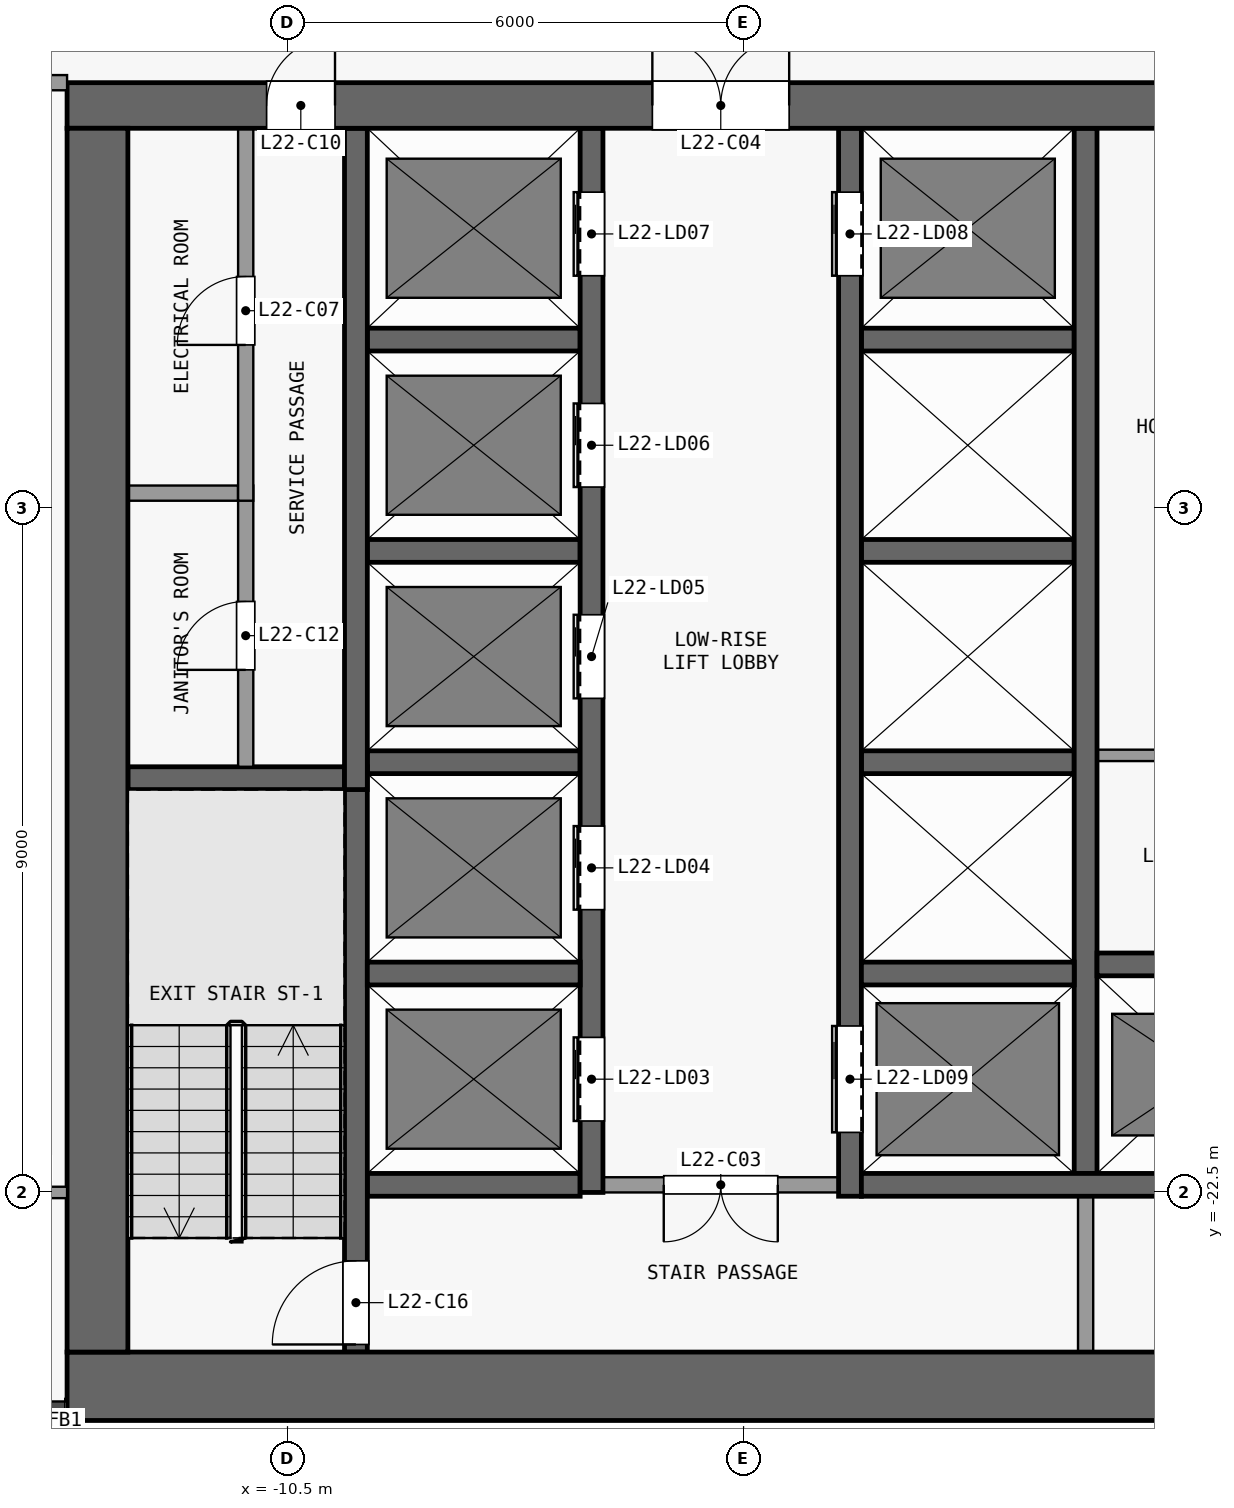
"""IFC4 building model, lengths in metres.
Left out: names, types, materials, properties, quantities, classifications, styles, units other than length and angle.
Written with IfcOpenShell. Run it as: python <this file> out.ifc"""

import sys

from ifc_helpers import new_model, si_unit, direction, frame, frame_2d, origin, place, context, subcontext, project, spatial, rectangle, extrude, element, fill, save


model = new_model("IFC4")
c1 = context("Model", 3, precision=1e-05, world=origin(), true_north=direction((0.0, 1.0)))
c2 = subcontext(c1, "Body", "Model", "MODEL_VIEW")
j1 = project(units=[si_unit("LENGTHUNIT", "METRE"), si_unit("PLANEANGLEUNIT", "RADIAN")], contexts=[c1])
p1 = place(None, origin())
s1 = spatial("IfcSite", under=j1, at=p1, CompositionType="ELEMENT")
p2 = place(p1, origin())
s2 = spatial("IfcBuilding", under=s1, at=p2, CompositionType="ELEMENT")
p3 = place(p2, frame((0.0, 0.0, 91.9)))
s3 = spatial("IfcBuildingStorey", under=s2, at=p3, CompositionType="ELEMENT", Elevation=91.9)
p4 = place(p3, frame((-13.4, -25.05, 0.0), z_axis=(0.0, 0.0, 1.0), x_axis=(1.0, 0.0, 0.0)))
e1 = element("IfcWall", 1, at=p4, inside=s3, PredefinedType="SHEAR", context=c2, shape_type="SweptSolid", body=[
    extrude(rectangle(XDim=26.8, YDim=0.9, at=frame_2d((13.4, 0.0))), origin(), (0.0, 0.0, 1.0), 3.3),
])
p5 = place(p3, frame((-13.4, -8.2, 0.0), z_axis=(0.0, 0.0, 1.0), x_axis=(1.0, 0.0, 0.0)))
e2 = element("IfcWall", 2, at=p5, inside=s3, PredefinedType="SHEAR", context=c2, shape_type="SweptSolid", body=[
    extrude(rectangle(XDim=26.8, YDim=0.6, at=frame_2d((13.4, 0.0))), origin(), (0.0, 0.0, 1.0), 3.3),
])
p6 = place(p5, frame((7.7, 0.0, 0.0)))
e3 = element("IfcOpeningElement", 3, at=p6, cuts=e2, PredefinedType="OPENING", context=c2, shape_type="SweptSolid", body=[
    extrude(rectangle(XDim=1.8, YDim=2.1, at=frame_2d((0.9, 1.05))), frame((0.0, 0.31, 0.0), z_axis=(0.0, -1.0, 0.0), x_axis=(1.0, 0.0, 0.0)), (0.0, 0.0, 1.0), 0.62),
])
p7 = place(p5, frame((17.3, 0.0, 0.0)))
e4 = element("IfcOpeningElement", 4, at=p7, cuts=e2, PredefinedType="OPENING", context=c2, shape_type="SweptSolid", body=[
    extrude(rectangle(XDim=1.8, YDim=2.1, at=frame_2d((0.9, 1.05))), frame((0.0, 0.31, 0.0), z_axis=(0.0, -1.0, 0.0), x_axis=(1.0, 0.0, 0.0)), (0.0, 0.0, 1.0), 0.62),
])
p8 = place(p5, frame((2.625, 0.0, 0.0)))
e5 = element("IfcOpeningElement", 5, at=p8, cuts=e2, PredefinedType="OPENING", context=c2, shape_type="SweptSolid", body=[
    extrude(rectangle(XDim=0.9, YDim=2.1, at=frame_2d((0.45, 1.05))), frame((0.0, 0.31, 0.0), z_axis=(0.0, -1.0, 0.0), x_axis=(1.0, 0.0, 0.0)), (0.0, 0.0, 1.0), 0.62),
])
p9 = place(p5, frame((23.275, 0.0, 0.0)))
e6 = element("IfcOpeningElement", 6, at=p9, cuts=e2, PredefinedType="OPENING", context=c2, shape_type="SweptSolid", body=[
    extrude(rectangle(XDim=0.9, YDim=2.1, at=frame_2d((0.45, 1.05))), frame((0.0, 0.31, 0.0), z_axis=(0.0, -1.0, 0.0), x_axis=(1.0, 0.0, 0.0)), (0.0, 0.0, 1.0), 0.62),
])
p10 = place(p3, frame((-13.0, -24.6, 0.0), z_axis=(0.0, 0.0, 1.0), x_axis=(0.0, 1.0, 0.0)))
e7 = element("IfcWall", 7, at=p10, inside=s3, PredefinedType="SHEAR", context=c2, shape_type="SweptSolid", body=[
    extrude(rectangle(XDim=16.1, YDim=0.8, at=frame_2d((8.05, 0.0))), origin(), (0.0, 0.0, 1.0), 3.3),
])
p11 = place(p3, frame((-9.45, -22.4, 0.0), z_axis=(0.0, 0.0, 1.0), x_axis=(1.0, 0.0, 0.0)))
e8 = element("IfcWall", 8, at=p11, inside=s3, PredefinedType="SHEAR", context=c2, shape_type="SweptSolid", body=[
    extrude(rectangle(XDim=2.8, YDim=0.3, at=frame_2d((1.4, 0.0))), origin(), (0.0, 0.0, 1.0), 3.3),
])
p12 = place(p3, frame((-3.25, -22.4, 0.0), z_axis=(0.0, 0.0, 1.0), x_axis=(-1.0, 0.0, 0.0)))
e9 = element("IfcWall", 9, at=p12, inside=s3, PredefinedType="PARTITIONING", context=c2, shape_type="SweptSolid", body=[
    extrude(rectangle(XDim=3.1, YDim=0.2, at=frame_2d((1.55, 0.0))), origin(), (0.0, 0.0, 1.0), 3.3),
])
p13 = place(p12, frame((0.8, 0.0, 0.0)))
e10 = element("IfcOpeningElement", 10, at=p13, cuts=e9, PredefinedType="OPENING", context=c2, shape_type="SweptSolid", body=[
    extrude(rectangle(XDim=1.5, YDim=2.1, at=frame_2d((0.75, 1.05))), frame((0.0, 0.11, 0.0), z_axis=(0.0, -1.0, 0.0), x_axis=(1.0, 0.0, 0.0)), (0.0, 0.0, 1.0), 0.22),
])
p14 = place(p3, frame((-2.95, -22.4, 0.0), z_axis=(0.0, 0.0, 1.0), x_axis=(1.0, 0.0, 0.0)))
e11 = element("IfcWall", 11, at=p14, inside=s3, PredefinedType="SHEAR", context=c2, shape_type="SweptSolid", body=[
    extrude(rectangle(XDim=6.2, YDim=0.3, at=frame_2d((3.1, 0.0))), origin(), (0.0, 0.0, 1.0), 3.3),
])
for number, where, z_axis, x_axis in (
    (12, (-9.45, -19.62, 0.0), (0.0, 0.0, 1.0), (1.0, 0.0, 0.0)),
    (13, (-2.95, -19.62, 0.0), (0.0, 0.0, 1.0), (1.0, 0.0, 0.0)),
):
    element("IfcWall", number, at=place(p3, frame(where, z_axis=z_axis, x_axis=x_axis)), inside=s3, PredefinedType="SHEAR", context=c2, shape_type="SweptSolid", body=[
        extrude(rectangle(XDim=2.8, YDim=0.3, at=frame_2d((1.4, 0.0))), origin(), (0.0, 0.0, 1.0), 3.3),
    ])
p15 = place(p3, frame((0.15, -19.5, 0.0), z_axis=(0.0, 0.0, 1.0), x_axis=(1.0, 0.0, 0.0)))
e14 = element("IfcWall", 14, at=p15, inside=s3, PredefinedType="SHEAR", context=c2, shape_type="SweptSolid", body=[
    extrude(rectangle(XDim=3.025, YDim=0.3, at=frame_2d((1.513, 0.0))), origin(), (0.0, 0.0, 1.0), 3.3),
])
p16 = place(p3, frame((-12.6, -17.05, 0.0), z_axis=(0.0, 0.0, 1.0), x_axis=(1.0, 0.0, 0.0)))
e15 = element("IfcWall", 15, at=p16, inside=s3, PredefinedType="SHEAR", context=c2, shape_type="SweptSolid", body=[
    extrude(rectangle(XDim=2.85, YDim=0.3, at=frame_2d((1.425, 0.0))), origin(), (0.0, 0.0, 1.0), 3.3),
])
for number, where, z_axis, x_axis in (
    (16, (-9.45, -16.84, 0.0), (0.0, 0.0, 1.0), (1.0, 0.0, 0.0)),
    (17, (-2.95, -16.84, 0.0), (0.0, 0.0, 1.0), (1.0, 0.0, 0.0)),
):
    element("IfcWall", number, at=place(p3, frame(where, z_axis=z_axis, x_axis=x_axis)), inside=s3, PredefinedType="SHEAR", context=c2, shape_type="SweptSolid", body=[
        extrude(rectangle(XDim=2.8, YDim=0.3, at=frame_2d((1.4, 0.0))), origin(), (0.0, 0.0, 1.0), 3.3),
    ])
p17 = place(p3, frame((0.15, -16.75, 0.0), z_axis=(0.0, 0.0, 1.0), x_axis=(1.0, 0.0, 0.0)))
e18 = element("IfcWall", 18, at=p17, inside=s3, PredefinedType="PARTITIONING", context=c2, shape_type="SweptSolid", body=[
    extrude(rectangle(XDim=2.875, YDim=0.15, at=frame_2d((1.438, 0.0))), origin(), (0.0, 0.0, 1.0), 3.3),
])
for number, where, z_axis, x_axis in (
    (19, (-9.45, -14.06, 0.0), (0.0, 0.0, 1.0), (1.0, 0.0, 0.0)),
    (20, (-2.95, -14.06, 0.0), (0.0, 0.0, 1.0), (1.0, 0.0, 0.0)),
):
    element("IfcWall", number, at=place(p3, frame(where, z_axis=z_axis, x_axis=x_axis)), inside=s3, PredefinedType="SHEAR", context=c2, shape_type="SweptSolid", body=[
        extrude(rectangle(XDim=2.8, YDim=0.3, at=frame_2d((1.4, 0.0))), origin(), (0.0, 0.0, 1.0), 3.3),
    ])
p18 = place(p3, frame((-12.6, -13.3, 0.0), z_axis=(0.0, 0.0, 1.0), x_axis=(1.0, 0.0, 0.0)))
e21 = element("IfcWall", 21, at=p18, inside=s3, PredefinedType="PARTITIONING", context=c2, shape_type="SweptSolid", body=[
    extrude(rectangle(XDim=1.45, YDim=0.2, at=frame_2d((0.725, 0.0))), origin(), (0.0, 0.0, 1.0), 3.3),
])
for number, where, z_axis, x_axis in (
    (22, (-9.45, -11.28, 0.0), (0.0, 0.0, 1.0), (1.0, 0.0, 0.0)),
    (23, (-2.95, -11.28, 0.0), (0.0, 0.0, 1.0), (1.0, 0.0, 0.0)),
):
    element("IfcWall", number, at=place(p3, frame(where, z_axis=z_axis, x_axis=x_axis)), inside=s3, PredefinedType="SHEAR", context=c2, shape_type="SweptSolid", body=[
        extrude(rectangle(XDim=2.8, YDim=0.3, at=frame_2d((1.4, 0.0))), origin(), (0.0, 0.0, 1.0), 3.3),
    ])
p19 = place(p3, frame((-11.05, -16.9, 0.0), z_axis=(0.0, 0.0, 1.0), x_axis=(0.0, 1.0, 0.0)))
e24 = element("IfcWall", 24, at=p19, inside=s3, PredefinedType="PARTITIONING", context=c2, shape_type="SweptSolid", body=[
    extrude(rectangle(XDim=3.7, YDim=0.2, at=frame_2d((1.85, 0.0))), origin(), (0.0, 0.0, 1.0), 3.3),
])
p20 = place(p19, frame((1.275, 0.0, 0.0)))
e25 = element("IfcOpeningElement", 25, at=p20, cuts=e24, PredefinedType="OPENING", context=c2, shape_type="SweptSolid", body=[
    extrude(rectangle(XDim=0.9, YDim=2.1, at=frame_2d((0.45, 1.05))), frame((0.0, 0.11, 0.0), z_axis=(0.0, -1.0, 0.0), x_axis=(1.0, 0.0, 0.0)), (0.0, 0.0, 1.0), 0.22),
])
p21 = place(p3, frame((-11.05, -13.4, 0.0), z_axis=(0.0, 0.0, 1.0), x_axis=(0.0, 1.0, 0.0)))
e26 = element("IfcWall", 26, at=p21, inside=s3, PredefinedType="PARTITIONING", context=c2, shape_type="SweptSolid", body=[
    extrude(rectangle(XDim=4.9, YDim=0.2, at=frame_2d((2.45, 0.0))), origin(), (0.0, 0.0, 1.0), 3.3),
])
p22 = place(p21, frame((2.05, 0.0, 0.0)))
e27 = element("IfcOpeningElement", 27, at=p22, cuts=e26, PredefinedType="OPENING", context=c2, shape_type="SweptSolid", body=[
    extrude(rectangle(XDim=0.9, YDim=2.1, at=frame_2d((0.45, 1.05))), frame((0.0, 0.11, 0.0), z_axis=(0.0, -1.0, 0.0), x_axis=(1.0, 0.0, 0.0)), (0.0, 0.0, 1.0), 0.22),
])
p23 = place(p3, frame((-9.6, -24.6, 0.0), z_axis=(0.0, 0.0, 1.0), x_axis=(0.0, 1.0, 0.0)))
e28 = element("IfcWall", 28, at=p23, inside=s3, PredefinedType="SHEAR", context=c2, shape_type="SweptSolid", body=[
    extrude(rectangle(XDim=7.7, YDim=0.3, at=frame_2d((3.85, 0.0))), origin(), (0.0, 0.0, 1.0), 3.3),
])
p24 = place(p23, frame((0.1, 0.0, 0.0)))
e29 = element("IfcOpeningElement", 29, at=p24, cuts=e28, PredefinedType="OPENING", context=c2, shape_type="SweptSolid", body=[
    extrude(rectangle(XDim=1.1, YDim=2.1, at=frame_2d((0.55, 1.05))), frame((0.0, 0.16, 0.0), z_axis=(0.0, -1.0, 0.0), x_axis=(1.0, 0.0, 0.0)), (0.0, 0.0, 1.0), 0.32),
])
p25 = place(p3, frame((-9.6, -17.2, 0.0), z_axis=(0.0, 0.0, 1.0), x_axis=(0.0, 1.0, 0.0)))
e30 = element("IfcWall", 30, at=p25, inside=s3, PredefinedType="SHEAR", context=c2, shape_type="SweptSolid", body=[
    extrude(rectangle(XDim=8.7, YDim=0.3, at=frame_2d((4.35, 0.0))), origin(), (0.0, 0.0, 1.0), 3.3),
])
p26 = place(p3, frame((-6.5, -22.5, 0.0), z_axis=(0.0, 0.0, 1.0), x_axis=(0.0, 1.0, 0.0)))
e31 = element("IfcWall", 31, at=p26, inside=s3, PredefinedType="SHEAR", context=c2, shape_type="SweptSolid", body=[
    extrude(rectangle(XDim=14.0, YDim=0.3, at=frame_2d((7.0, 0.0))), origin(), (0.0, 0.0, 1.0), 3.3),
])
p27 = place(p26, frame((0.94, 0.0, 0.0)))
e32 = element("IfcOpeningElement", 32, at=p27, cuts=e31, PredefinedType="OPENING", context=c2, shape_type="SweptSolid", body=[
    extrude(rectangle(XDim=1.1, YDim=2.1, at=frame_2d((0.55, 1.05))), frame((0.0, 0.16, 0.0), z_axis=(0.0, -1.0, 0.0), x_axis=(1.0, 0.0, 0.0)), (0.0, 0.0, 1.0), 0.32),
])
p28 = place(p26, frame((3.72, 0.0, 0.0)))
e33 = element("IfcOpeningElement", 33, at=p28, cuts=e31, PredefinedType="OPENING", context=c2, shape_type="SweptSolid", body=[
    extrude(rectangle(XDim=1.1, YDim=2.1, at=frame_2d((0.55, 1.05))), frame((0.0, 0.16, 0.0), z_axis=(0.0, -1.0, 0.0), x_axis=(1.0, 0.0, 0.0)), (0.0, 0.0, 1.0), 0.32),
])
p29 = place(p26, frame((6.5, 0.0, 0.0)))
e34 = element("IfcOpeningElement", 34, at=p29, cuts=e31, PredefinedType="OPENING", context=c2, shape_type="SweptSolid", body=[
    extrude(rectangle(XDim=1.1, YDim=2.1, at=frame_2d((0.55, 1.05))), frame((0.0, 0.16, 0.0), z_axis=(0.0, -1.0, 0.0), x_axis=(1.0, 0.0, 0.0)), (0.0, 0.0, 1.0), 0.32),
])
p30 = place(p26, frame((9.28, 0.0, 0.0)))
e35 = element("IfcOpeningElement", 35, at=p30, cuts=e31, PredefinedType="OPENING", context=c2, shape_type="SweptSolid", body=[
    extrude(rectangle(XDim=1.1, YDim=2.1, at=frame_2d((0.55, 1.05))), frame((0.0, 0.16, 0.0), z_axis=(0.0, -1.0, 0.0), x_axis=(1.0, 0.0, 0.0)), (0.0, 0.0, 1.0), 0.32),
])
p31 = place(p26, frame((12.06, 0.0, 0.0)))
e36 = element("IfcOpeningElement", 36, at=p31, cuts=e31, PredefinedType="OPENING", context=c2, shape_type="SweptSolid", body=[
    extrude(rectangle(XDim=1.1, YDim=2.1, at=frame_2d((0.55, 1.05))), frame((0.0, 0.16, 0.0), z_axis=(0.0, -1.0, 0.0), x_axis=(1.0, 0.0, 0.0)), (0.0, 0.0, 1.0), 0.32),
])
p32 = place(p3, frame((-3.1, -22.55, 0.0), z_axis=(0.0, 0.0, 1.0), x_axis=(0.0, 1.0, 0.0)))
e37 = element("IfcWall", 37, at=p32, inside=s3, PredefinedType="SHEAR", context=c2, shape_type="SweptSolid", body=[
    extrude(rectangle(XDim=14.05, YDim=0.3, at=frame_2d((7.025, 0.0))), origin(), (0.0, 0.0, 1.0), 3.3),
])
p33 = place(p32, frame((12.11, 0.0, 0.0)))
e38 = element("IfcOpeningElement", 38, at=p33, cuts=e37, PredefinedType="OPENING", context=c2, shape_type="SweptSolid", body=[
    extrude(rectangle(XDim=1.1, YDim=2.1, at=frame_2d((0.55, 1.05))), frame((0.0, 0.16, 0.0), z_axis=(0.0, -1.0, 0.0), x_axis=(1.0, 0.0, 0.0)), (0.0, 0.0, 1.0), 0.32),
])
p34 = place(p32, frame((0.84, 0.0, 0.0)))
e39 = element("IfcOpeningElement", 39, at=p34, cuts=e37, PredefinedType="OPENING", context=c2, shape_type="SweptSolid", body=[
    extrude(rectangle(XDim=1.4, YDim=2.1, at=frame_2d((0.7, 1.05))), frame((0.0, 0.16, 0.0), z_axis=(0.0, -1.0, 0.0), x_axis=(1.0, 0.0, 0.0)), (0.0, 0.0, 1.0), 0.32),
])
p35 = place(p3, frame((0.0, -24.6, 0.0), z_axis=(0.0, 0.0, 1.0), x_axis=(0.0, 1.0, 0.0)))
e40 = element("IfcWall", 40, at=p35, inside=s3, PredefinedType="PARTITIONING", context=c2, shape_type="SweptSolid", body=[
    extrude(rectangle(XDim=2.05, YDim=0.2, at=frame_2d((1.025, 0.0))), origin(), (0.0, 0.0, 1.0), 3.3),
])
p36 = place(p3, frame((0.0, -22.25, 0.0), z_axis=(0.0, 0.0, 1.0), x_axis=(0.0, 1.0, 0.0)))
e41 = element("IfcWall", 41, at=p36, inside=s3, PredefinedType="SHEAR", context=c2, shape_type="SweptSolid", body=[
    extrude(rectangle(XDim=13.75, YDim=0.3, at=frame_2d((6.875, 0.0))), origin(), (0.0, 0.0, 1.0), 3.3),
])
p37 = place(p3, frame((-16.325, -22.5, 0.0), z_axis=(0.0, 0.0, 1.0), x_axis=(1.0, 0.0, 0.0)))
e42 = element("IfcWall", 42, at=p37, inside=s3, PredefinedType="PARTITIONING", context=c2, shape_type="SweptSolid", body=[
    extrude(rectangle(XDim=2.925, YDim=0.15, at=frame_2d((1.462, 0.0))), origin(), (0.0, 0.0, 1.0), 3.3),
])
p38 = place(p37, frame((1.0, 0.0, 0.0)))
e43 = element("IfcOpeningElement", 43, at=p38, cuts=e42, PredefinedType="OPENING", context=c2, shape_type="SweptSolid", body=[
    extrude(rectangle(XDim=0.9, YDim=2.1, at=frame_2d((0.45, 1.05))), frame((0.0, 0.085, 0.0), z_axis=(0.0, -1.0, 0.0), x_axis=(1.0, 0.0, 0.0)), (0.0, 0.0, 1.0), 0.17),
])
p39 = place(p3, frame((-25.25, -7.9, 0.0), z_axis=(0.0, 0.0, 1.0), x_axis=(1.0, 0.0, 0.0)))
e44 = element("IfcWall", 44, at=p39, inside=s3, PredefinedType="PARTITIONING", context=c2, shape_type="SweptSolid", body=[
    extrude(rectangle(XDim=11.85, YDim=0.2, at=frame_2d((5.925, 0.0))), origin(), (0.0, 0.0, 1.0), 3.3),
])
p40 = place(p39, frame((9.85, 0.0, 0.0)))
e45 = element("IfcOpeningElement", 45, at=p40, cuts=e44, PredefinedType="OPENING", context=c2, shape_type="SweptSolid", body=[
    extrude(rectangle(XDim=1.0, YDim=2.1, at=frame_2d((0.5, 1.05))), frame((0.0, 0.11, 0.0), z_axis=(0.0, -1.0, 0.0), x_axis=(1.0, 0.0, 0.0)), (0.0, 0.0, 1.0), 0.22),
])
p41 = place(p27, origin())
e46 = element("IfcDoor", 46, at=p41, inside=s3, OperationType="DOUBLE_DOOR_SLIDING", PredefinedType="DOOR", context=c2, shape_type="SweptSolid", body=[
    extrude(rectangle(XDim=1.1, YDim=2.1, at=frame_2d((0.55, 1.05))), frame((0.0, 0.025, 0.0), z_axis=(0.0, -1.0, 0.0), x_axis=(1.0, 0.0, 0.0)), (0.0, 0.0, 1.0), 0.05),
])
fill(e32, e46)
p42 = place(p28, origin())
e47 = element("IfcDoor", 47, at=p42, inside=s3, OperationType="DOUBLE_DOOR_SLIDING", PredefinedType="DOOR", context=c2, shape_type="SweptSolid", body=[
    extrude(rectangle(XDim=1.1, YDim=2.1, at=frame_2d((0.55, 1.05))), frame((0.0, 0.025, 0.0), z_axis=(0.0, -1.0, 0.0), x_axis=(1.0, 0.0, 0.0)), (0.0, 0.0, 1.0), 0.05),
])
fill(e33, e47)
p43 = place(p29, origin())
e48 = element("IfcDoor", 48, at=p43, inside=s3, OperationType="DOUBLE_DOOR_SLIDING", PredefinedType="DOOR", context=c2, shape_type="SweptSolid", body=[
    extrude(rectangle(XDim=1.1, YDim=2.1, at=frame_2d((0.55, 1.05))), frame((0.0, 0.025, 0.0), z_axis=(0.0, -1.0, 0.0), x_axis=(1.0, 0.0, 0.0)), (0.0, 0.0, 1.0), 0.05),
])
fill(e34, e48)
p44 = place(p30, origin())
e49 = element("IfcDoor", 49, at=p44, inside=s3, OperationType="DOUBLE_DOOR_SLIDING", PredefinedType="DOOR", context=c2, shape_type="SweptSolid", body=[
    extrude(rectangle(XDim=1.1, YDim=2.1, at=frame_2d((0.55, 1.05))), frame((0.0, 0.025, 0.0), z_axis=(0.0, -1.0, 0.0), x_axis=(1.0, 0.0, 0.0)), (0.0, 0.0, 1.0), 0.05),
])
fill(e35, e49)
p45 = place(p31, origin())
e50 = element("IfcDoor", 50, at=p45, inside=s3, OperationType="DOUBLE_DOOR_SLIDING", PredefinedType="DOOR", context=c2, shape_type="SweptSolid", body=[
    extrude(rectangle(XDim=1.1, YDim=2.1, at=frame_2d((0.55, 1.05))), frame((0.0, 0.025, 0.0), z_axis=(0.0, -1.0, 0.0), x_axis=(1.0, 0.0, 0.0)), (0.0, 0.0, 1.0), 0.05),
])
fill(e36, e50)
p46 = place(p33, origin())
e51 = element("IfcDoor", 51, at=p46, inside=s3, OperationType="DOUBLE_DOOR_SLIDING", PredefinedType="DOOR", context=c2, shape_type="SweptSolid", body=[
    extrude(rectangle(XDim=1.1, YDim=2.1, at=frame_2d((0.55, 1.05))), frame((0.0, 0.025, 0.0), z_axis=(0.0, -1.0, 0.0), x_axis=(1.0, 0.0, 0.0)), (0.0, 0.0, 1.0), 0.05),
])
fill(e38, e51)
p47 = place(p34, origin())
e52 = element("IfcDoor", 52, at=p47, inside=s3, OperationType="DOUBLE_DOOR_SLIDING", PredefinedType="DOOR", context=c2, shape_type="SweptSolid", body=[
    extrude(rectangle(XDim=1.4, YDim=2.1, at=frame_2d((0.7, 1.05))), frame((0.0, 0.025, 0.0), z_axis=(0.0, -1.0, 0.0), x_axis=(1.0, 0.0, 0.0)), (0.0, 0.0, 1.0), 0.05),
])
fill(e39, e52)
p48 = place(p13, origin())
e53 = element("IfcDoor", 53, at=p48, inside=s3, OperationType="DOUBLE_DOOR_SINGLE_SWING", PredefinedType="DOOR", context=c2, shape_type="SweptSolid", body=[
    extrude(rectangle(XDim=1.5, YDim=2.1, at=frame_2d((0.75, 1.05))), frame((0.0, 0.025, 0.0), z_axis=(0.0, -1.0, 0.0), x_axis=(1.0, 0.0, 0.0)), (0.0, 0.0, 1.0), 0.05),
])
fill(e10, e53)
p49 = place(p6, origin())
e54 = element("IfcDoor", 54, at=p49, inside=s3, OperationType="DOUBLE_DOOR_SINGLE_SWING", PredefinedType="DOOR", context=c2, shape_type="SweptSolid", body=[
    extrude(rectangle(XDim=1.8, YDim=2.1, at=frame_2d((0.9, 1.05))), frame((0.0, 0.025, 0.0), z_axis=(0.0, -1.0, 0.0), x_axis=(1.0, 0.0, 0.0)), (0.0, 0.0, 1.0), 0.05),
])
fill(e3, e54)
p50 = place(p22, origin())
e55 = element("IfcDoor", 55, at=p50, inside=s3, OperationType="SINGLE_SWING_LEFT", PredefinedType="DOOR", context=c2, shape_type="SweptSolid", body=[
    extrude(rectangle(XDim=0.9, YDim=2.1, at=frame_2d((0.45, 1.05))), frame((0.0, 0.025, 0.0), z_axis=(0.0, -1.0, 0.0), x_axis=(1.0, 0.0, 0.0)), (0.0, 0.0, 1.0), 0.05),
])
fill(e27, e55)
p51 = place(p8, origin())
e56 = element("IfcDoor", 56, at=p51, inside=s3, OperationType="SINGLE_SWING_RIGHT", PredefinedType="DOOR", context=c2, shape_type="SweptSolid", body=[
    extrude(rectangle(XDim=0.9, YDim=2.1, at=frame_2d((0.45, 1.05))), frame((0.0, 0.025, 0.0), z_axis=(0.0, -1.0, 0.0), x_axis=(1.0, 0.0, 0.0)), (0.0, 0.0, 1.0), 0.05),
])
fill(e5, e56)
p52 = place(p20, origin())
e57 = element("IfcDoor", 57, at=p52, inside=s3, OperationType="SINGLE_SWING_LEFT", PredefinedType="DOOR", context=c2, shape_type="SweptSolid", body=[
    extrude(rectangle(XDim=0.9, YDim=2.1, at=frame_2d((0.45, 1.05))), frame((0.0, 0.025, 0.0), z_axis=(0.0, -1.0, 0.0), x_axis=(1.0, 0.0, 0.0)), (0.0, 0.0, 1.0), 0.05),
])
fill(e25, e57)
p53 = place(p24, origin())
e58 = element("IfcDoor", 58, at=p53, inside=s3, OperationType="SINGLE_SWING_LEFT", PredefinedType="DOOR", context=c2, shape_type="SweptSolid", body=[
    extrude(rectangle(XDim=1.1, YDim=2.1, at=frame_2d((0.55, 1.05))), frame((0.0, 0.025, 0.0), z_axis=(0.0, -1.0, 0.0), x_axis=(1.0, 0.0, 0.0)), (0.0, 0.0, 1.0), 0.05),
])
fill(e29, e58)
save(model, sys.argv[1])
